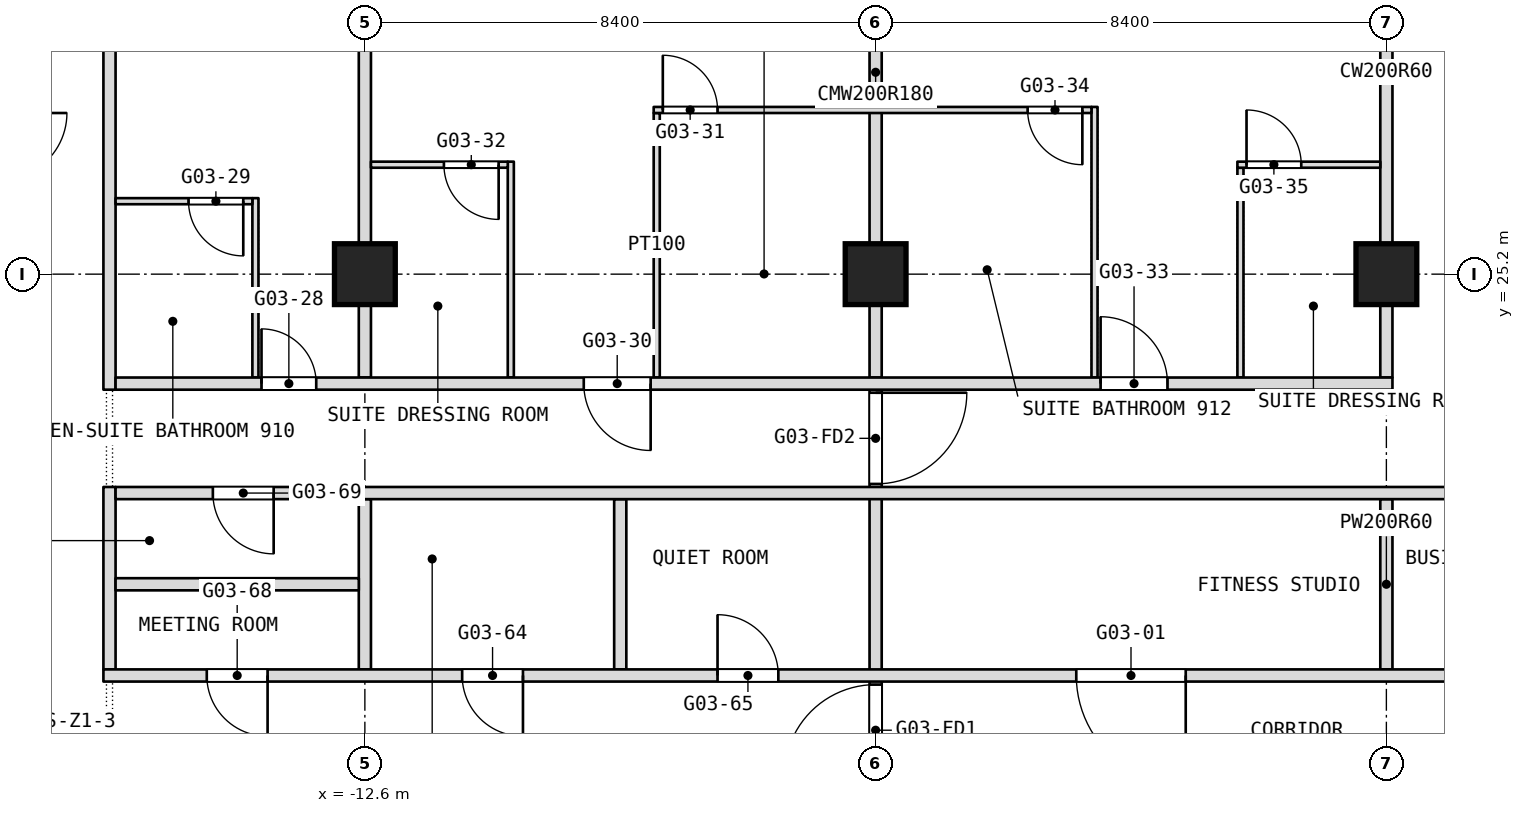
"""IFC4 building model, lengths in metres.
Left out: names, types, materials, properties, quantities, classifications, styles, units other than length and angle.
Written with IfcOpenShell. Run it as: python <this file> out.ifc"""

import sys

from ifc_helpers import new_model, si_unit, direction, frame, frame_2d, origin, origin_2d, place, context, subcontext, project, spatial, rectangle, extrude, element, fill, save


model = new_model("IFC4")
c1 = context("Model", 3, precision=1e-05, world=origin(), true_north=direction((0.0, 1.0)))
c2 = subcontext(c1, "Body", "Model", "MODEL_VIEW")
j1 = project(units=[si_unit("LENGTHUNIT", "METRE"), si_unit("PLANEANGLEUNIT", "RADIAN")], contexts=[c1])
p1 = place(None, origin())
s1 = spatial("IfcSite", under=j1, at=p1, CompositionType="ELEMENT")
p2 = place(p1, origin())
s2 = spatial("IfcBuilding", under=s1, at=p2, CompositionType="ELEMENT")
p3 = place(p2, frame((0.0, 0.0, 47.3)))
s3 = spatial("IfcBuildingStorey", under=s2, at=p3, CompositionType="ELEMENT", Elevation=47.3)
for number, where, z_axis, x_axis in (
    (1, (-12.6, 25.2, 0.0), (0.0, 0.0, 1.0), (1.0, 0.0, 0.0)),
    (2, (-4.2, 25.2, 0.0), (0.0, 0.0, 1.0), (1.0, 0.0, 0.0)),
    (3, (4.2, 25.2, 0.0), (0.0, 0.0, 1.0), (1.0, 0.0, 0.0)),
):
    element("IfcColumn", number, at=place(p3, frame(where, z_axis=z_axis, x_axis=x_axis)), inside=s3, PredefinedType="COLUMN", context=c2, shape_type="SweptSolid", body=[
        extrude(rectangle(XDim=1.0, YDim=1.0, at=origin_2d()), origin(), (0.0, 0.0, 1.0), 3.6),
    ])
p4 = place(p3, frame((4.2, 18.7, 0.0), z_axis=(0.0, 0.0, 1.0), x_axis=(0.0, 1.0, 0.0)))
e4 = element("IfcWall", 4, at=p4, inside=s3, PredefinedType="PARTITIONING", context=c2, shape_type="SweptSolid", body=[
    extrude(rectangle(XDim=2.8, YDim=0.2, at=frame_2d((1.4, 0.0))), origin(), (0.0, 0.0, 1.0), 3.34),
])
p5 = place(p3, frame((4.2, 23.5, 0.0), z_axis=(0.0, 0.0, 1.0), x_axis=(0.0, 1.0, 0.0)))
e5 = element("IfcWall", 5, at=p5, inside=s3, PredefinedType="PARTITIONING", context=c2, shape_type="SweptSolid", body=[
    extrude(rectangle(XDim=10.04, YDim=0.2, at=frame_2d((5.02, 0.0))), origin(), (0.0, 0.0, 1.0), 3.34),
])
p6 = place(p3, frame((1.8, 23.5, 0.0), z_axis=(0.0, 0.0, 1.0), x_axis=(0.0, 1.0, 0.0)))
e6 = element("IfcWall", 6, at=p6, inside=s3, PredefinedType="PARTITIONING", context=c2, shape_type="SweptSolid", body=[
    extrude(rectangle(XDim=3.45, YDim=0.1, at=frame_2d((1.725, 0.0))), origin(), (0.0, 0.0, 1.0), 3.34),
])
p7 = place(p3, frame((-0.6, 23.5, 0.0), z_axis=(0.0, 0.0, 1.0), x_axis=(0.0, 1.0, 0.0)))
e7 = element("IfcWall", 7, at=p7, inside=s3, PredefinedType="PARTITIONING", context=c2, shape_type="SweptSolid", body=[
    extrude(rectangle(XDim=4.45, YDim=0.1, at=frame_2d((2.225, 0.0))), origin(), (0.0, 0.0, 1.0), 3.34),
])
p8 = place(p3, frame((-4.2, 16.8, 0.0), z_axis=(0.0, 0.0, 1.0), x_axis=(0.0, 1.0, 0.0)))
e8 = element("IfcWall", 8, at=p8, inside=s3, PredefinedType="PARTITIONING", context=c2, shape_type="SweptSolid", body=[
    extrude(rectangle(XDim=6.7, YDim=0.2, at=frame_2d((3.35, 0.0))), origin(), (0.0, 0.0, 1.0), 3.34),
])
p9 = place(p8, frame((0.15, 0.0, 0.0)))
e9 = element("IfcOpeningElement", 9, at=p9, cuts=e8, PredefinedType="OPENING", context=c2, shape_type="SweptSolid", body=[
    extrude(rectangle(XDim=1.5, YDim=2.1, at=frame_2d((0.75, 1.05))), frame((0.0, 0.1, 0.0), z_axis=(0.0, -1.0, 0.0), x_axis=(1.0, 0.0, 0.0)), (0.0, 0.0, 1.0), 0.2),
])
p10 = place(p8, frame((4.95, 0.0, 0.0)))
e10 = element("IfcOpeningElement", 10, at=p10, cuts=e8, PredefinedType="OPENING", context=c2, shape_type="SweptSolid", body=[
    extrude(rectangle(XDim=1.5, YDim=2.1, at=frame_2d((0.75, 1.05))), frame((0.0, 0.1, 0.0), z_axis=(0.0, -1.0, 0.0), x_axis=(1.0, 0.0, 0.0)), (0.0, 0.0, 1.0), 0.2),
])
p11 = place(p3, frame((-4.2, 23.5, 0.0), z_axis=(0.0, 0.0, 1.0), x_axis=(0.0, 1.0, 0.0)))
e11 = element("IfcWall", 11, at=p11, inside=s3, PredefinedType="PARTITIONING", context=c2, shape_type="SweptSolid", body=[
    extrude(rectangle(XDim=10.04, YDim=0.2, at=frame_2d((5.02, 0.0))), origin(), (0.0, 0.0, 1.0), 3.34),
])
p12 = place(p3, frame((-7.8, 23.5, 0.0), z_axis=(0.0, 0.0, 1.0), x_axis=(0.0, 1.0, 0.0)))
e12 = element("IfcWall", 12, at=p12, inside=s3, PredefinedType="PARTITIONING", context=c2, shape_type="SweptSolid", body=[
    extrude(rectangle(XDim=4.35, YDim=0.1, at=frame_2d((2.175, 0.0))), origin(), (0.0, 0.0, 1.0), 3.34),
])
p13 = place(p3, frame((-8.4, 18.7, 0.0), z_axis=(0.0, 0.0, 1.0), x_axis=(0.0, 1.0, 0.0)))
e13 = element("IfcWall", 13, at=p13, inside=s3, PredefinedType="PARTITIONING", context=c2, shape_type="SweptSolid", body=[
    extrude(rectangle(XDim=2.8, YDim=0.2, at=frame_2d((1.4, 0.0))), origin(), (0.0, 0.0, 1.0), 3.34),
])
p14 = place(p3, frame((-10.2, 23.5, 0.0), z_axis=(0.0, 0.0, 1.0), x_axis=(0.0, 1.0, 0.0)))
e14 = element("IfcWall", 14, at=p14, inside=s3, PredefinedType="PARTITIONING", context=c2, shape_type="SweptSolid", body=[
    extrude(rectangle(XDim=3.55, YDim=0.1, at=frame_2d((1.775, 0.0))), origin(), (0.0, 0.0, 1.0), 3.34),
])
p15 = place(p3, frame((-12.6, 18.7, 0.0), z_axis=(0.0, 0.0, 1.0), x_axis=(0.0, 1.0, 0.0)))
e15 = element("IfcWall", 15, at=p15, inside=s3, PredefinedType="PARTITIONING", context=c2, shape_type="SweptSolid", body=[
    extrude(rectangle(XDim=2.8, YDim=0.2, at=frame_2d((1.4, 0.0))), origin(), (0.0, 0.0, 1.0), 3.34),
])
p16 = place(p3, frame((-12.6, 23.5, 0.0), z_axis=(0.0, 0.0, 1.0), x_axis=(0.0, 1.0, 0.0)))
e16 = element("IfcWall", 16, at=p16, inside=s3, PredefinedType="PARTITIONING", context=c2, shape_type="SweptSolid", body=[
    extrude(rectangle(XDim=10.04, YDim=0.2, at=frame_2d((5.02, 0.0))), origin(), (0.0, 0.0, 1.0), 3.34),
])
p17 = place(p3, frame((-14.4, 23.5, 0.0), z_axis=(0.0, 0.0, 1.0), x_axis=(0.0, 1.0, 0.0)))
e17 = element("IfcWall", 17, at=p17, inside=s3, PredefinedType="PARTITIONING", context=c2, shape_type="SweptSolid", body=[
    extrude(rectangle(XDim=2.95, YDim=0.1, at=frame_2d((1.475, 0.0))), origin(), (0.0, 0.0, 1.0), 3.34),
])
p18 = place(p3, frame((-16.8, 18.7, 0.0), z_axis=(0.0, 0.0, 1.0), x_axis=(0.0, 1.0, 0.0)))
e18 = element("IfcWall", 18, at=p18, inside=s3, PredefinedType="PARTITIONING", context=c2, shape_type="SweptSolid", body=[
    extrude(rectangle(XDim=3.0, YDim=0.2, at=frame_2d((1.5, 0.0))), origin(), (0.0, 0.0, 1.0), 3.34),
])
p19 = place(p3, frame((-16.8, 23.3, 0.0), z_axis=(0.0, 0.0, 1.0), x_axis=(0.0, 1.0, 0.0)))
e19 = element("IfcWall", 19, at=p19, inside=s3, PredefinedType="PARTITIONING", context=c2, shape_type="SweptSolid", body=[
    extrude(rectangle(XDim=10.24, YDim=0.2, at=frame_2d((5.12, 0.0))), origin(), (0.0, 0.0, 1.0), 3.34),
])
p20 = place(p3, frame((-16.9, 18.6, 0.0), z_axis=(0.0, 0.0, 1.0), x_axis=(1.0, 0.0, 0.0)))
e20 = element("IfcWall", 20, at=p20, inside=s3, PredefinedType="PARTITIONING", context=c2, shape_type="SweptSolid", body=[
    extrude(rectangle(XDim=25.1, YDim=0.2, at=frame_2d((12.55, 0.0))), origin(), (0.0, 0.0, 1.0), 3.34),
])
p21 = place(p20, frame((16.0, 0.0, 0.0)))
e21 = element("IfcOpeningElement", 21, at=p21, cuts=e20, PredefinedType="OPENING", context=c2, shape_type="SweptSolid", body=[
    extrude(rectangle(XDim=1.8, YDim=2.1, at=frame_2d((0.9, 1.05))), frame((0.0, 0.1, 0.0), z_axis=(0.0, -1.0, 0.0), x_axis=(1.0, 0.0, 0.0)), (0.0, 0.0, 1.0), 0.2),
])
p22 = place(p20, frame((22.55, 0.0, 0.0)))
e22 = element("IfcOpeningElement", 22, at=p22, cuts=e20, PredefinedType="OPENING", context=c2, shape_type="SweptSolid", body=[
    extrude(rectangle(XDim=1.0, YDim=2.1, at=frame_2d((0.5, 1.05))), frame((0.0, 0.1, 0.0), z_axis=(0.0, -1.0, 0.0), x_axis=(1.0, 0.0, 0.0)), (0.0, 0.0, 1.0), 0.2),
])
p23 = place(p20, frame((5.9, 0.0, 0.0)))
e23 = element("IfcOpeningElement", 23, at=p23, cuts=e20, PredefinedType="OPENING", context=c2, shape_type="SweptSolid", body=[
    extrude(rectangle(XDim=1.0, YDim=2.1, at=frame_2d((0.5, 1.05))), frame((0.0, 0.1, 0.0), z_axis=(0.0, -1.0, 0.0), x_axis=(1.0, 0.0, 0.0)), (0.0, 0.0, 1.0), 0.2),
])
p24 = place(p20, frame((10.1, 0.0, 0.0)))
e24 = element("IfcOpeningElement", 24, at=p24, cuts=e20, PredefinedType="OPENING", context=c2, shape_type="SweptSolid", body=[
    extrude(rectangle(XDim=1.0, YDim=2.1, at=frame_2d((0.5, 1.05))), frame((0.0, 0.1, 0.0), z_axis=(0.0, -1.0, 0.0), x_axis=(1.0, 0.0, 0.0)), (0.0, 0.0, 1.0), 0.2),
])
p25 = place(p20, frame((1.7, 0.0, 0.0)))
e25 = element("IfcOpeningElement", 25, at=p25, cuts=e20, PredefinedType="OPENING", context=c2, shape_type="SweptSolid", body=[
    extrude(rectangle(XDim=1.0, YDim=2.1, at=frame_2d((0.5, 1.05))), frame((0.0, 0.1, 0.0), z_axis=(0.0, -1.0, 0.0), x_axis=(1.0, 0.0, 0.0)), (0.0, 0.0, 1.0), 0.2),
])
p26 = place(p3, frame((-16.7, 20.1, 0.0), z_axis=(0.0, 0.0, 1.0), x_axis=(1.0, 0.0, 0.0)))
e26 = element("IfcWall", 26, at=p26, inside=s3, PredefinedType="PARTITIONING", context=c2, shape_type="SweptSolid", body=[
    extrude(rectangle(XDim=4.0, YDim=0.2, at=frame_2d((2.0, 0.0))), origin(), (0.0, 0.0, 1.0), 3.34),
])
p27 = place(p3, frame((-16.7, 21.6, 0.0), z_axis=(0.0, 0.0, 1.0), x_axis=(1.0, 0.0, 0.0)))
e27 = element("IfcWall", 27, at=p27, inside=s3, PredefinedType="PARTITIONING", context=c2, shape_type="SweptSolid", body=[
    extrude(rectangle(XDim=24.9, YDim=0.2, at=frame_2d((12.45, 0.0))), origin(), (0.0, 0.0, 1.0), 3.34),
])
p28 = place(p27, frame((1.6, 0.0, 0.0)))
e28 = element("IfcOpeningElement", 28, at=p28, cuts=e27, PredefinedType="OPENING", context=c2, shape_type="SweptSolid", body=[
    extrude(rectangle(XDim=1.0, YDim=2.1, at=frame_2d((0.5, 1.05))), frame((0.0, 0.1, 0.0), z_axis=(0.0, -1.0, 0.0), x_axis=(1.0, 0.0, 0.0)), (0.0, 0.0, 1.0), 0.2),
])
p29 = place(p3, frame((-16.7, 23.4, 0.0), z_axis=(0.0, 0.0, 1.0), x_axis=(1.0, 0.0, 0.0)))
e29 = element("IfcWall", 29, at=p29, inside=s3, PredefinedType="PARTITIONING", context=c2, shape_type="SweptSolid", body=[
    extrude(rectangle(XDim=21.0, YDim=0.2, at=frame_2d((10.5, 0.0))), origin(), (0.0, 0.0, 1.0), 3.34),
])
p30 = place(p29, frame((2.4, 0.0, 0.0)))
e30 = element("IfcOpeningElement", 30, at=p30, cuts=e29, PredefinedType="OPENING", context=c2, shape_type="SweptSolid", body=[
    extrude(rectangle(XDim=0.9, YDim=2.1, at=frame_2d((0.45, 1.05))), frame((0.0, 0.1, 0.0), z_axis=(0.0, -1.0, 0.0), x_axis=(1.0, 0.0, 0.0)), (0.0, 0.0, 1.0), 0.2),
])
p31 = place(p29, frame((7.7, 0.0, 0.0)))
e31 = element("IfcOpeningElement", 31, at=p31, cuts=e29, PredefinedType="OPENING", context=c2, shape_type="SweptSolid", body=[
    extrude(rectangle(XDim=1.1, YDim=2.1, at=frame_2d((0.55, 1.05))), frame((0.0, 0.1, 0.0), z_axis=(0.0, -1.0, 0.0), x_axis=(1.0, 0.0, 0.0)), (0.0, 0.0, 1.0), 0.2),
])
p32 = place(p29, frame((16.2, 0.0, 0.0)))
e32 = element("IfcOpeningElement", 32, at=p32, cuts=e29, PredefinedType="OPENING", context=c2, shape_type="SweptSolid", body=[
    extrude(rectangle(XDim=1.1, YDim=2.1, at=frame_2d((0.55, 1.05))), frame((0.0, 0.1, 0.0), z_axis=(0.0, -1.0, 0.0), x_axis=(1.0, 0.0, 0.0)), (0.0, 0.0, 1.0), 0.2),
])
p33 = place(p3, frame((-16.7, 26.4, 0.0), z_axis=(0.0, 0.0, 1.0), x_axis=(1.0, 0.0, 0.0)))
e33 = element("IfcWall", 33, at=p33, inside=s3, PredefinedType="PARTITIONING", context=c2, shape_type="SweptSolid", body=[
    extrude(rectangle(XDim=2.25, YDim=0.1, at=frame_2d((1.125, 0.0))), origin(), (0.0, 0.0, 1.0), 3.34),
])
p34 = place(p33, frame((1.2, 0.0, 0.0)))
e34 = element("IfcOpeningElement", 34, at=p34, cuts=e33, PredefinedType="OPENING", context=c2, shape_type="SweptSolid", body=[
    extrude(rectangle(XDim=0.9, YDim=2.1, at=frame_2d((0.45, 1.05))), frame((0.0, 0.05, 0.0), z_axis=(0.0, -1.0, 0.0), x_axis=(1.0, 0.0, 0.0)), (0.0, 0.0, 1.0), 0.1),
])
p35 = place(p3, frame((-12.5, 27.0, 0.0), z_axis=(0.0, 0.0, 1.0), x_axis=(1.0, 0.0, 0.0)))
e35 = element("IfcWall", 35, at=p35, inside=s3, PredefinedType="PARTITIONING", context=c2, shape_type="SweptSolid", body=[
    extrude(rectangle(XDim=2.25, YDim=0.1, at=frame_2d((1.125, 0.0))), origin(), (0.0, 0.0, 1.0), 3.34),
])
p36 = place(p35, frame((1.2, 0.0, 0.0)))
e36 = element("IfcOpeningElement", 36, at=p36, cuts=e35, PredefinedType="OPENING", context=c2, shape_type="SweptSolid", body=[
    extrude(rectangle(XDim=0.9, YDim=2.1, at=frame_2d((0.45, 1.05))), frame((0.0, 0.05, 0.0), z_axis=(0.0, -1.0, 0.0), x_axis=(1.0, 0.0, 0.0)), (0.0, 0.0, 1.0), 0.1),
])
p37 = place(p3, frame((1.75, 27.0, 0.0), z_axis=(0.0, 0.0, 1.0), x_axis=(1.0, 0.0, 0.0)))
e37 = element("IfcWall", 37, at=p37, inside=s3, PredefinedType="PARTITIONING", context=c2, shape_type="SweptSolid", body=[
    extrude(rectangle(XDim=2.35, YDim=0.1, at=frame_2d((1.175, 0.0))), origin(), (0.0, 0.0, 1.0), 3.34),
])
p38 = place(p37, frame((0.15, 0.0, 0.0)))
e38 = element("IfcOpeningElement", 38, at=p38, cuts=e37, PredefinedType="OPENING", context=c2, shape_type="SweptSolid", body=[
    extrude(rectangle(XDim=0.9, YDim=2.1, at=frame_2d((0.45, 1.05))), frame((0.0, 0.05, 0.0), z_axis=(0.0, -1.0, 0.0), x_axis=(1.0, 0.0, 0.0)), (0.0, 0.0, 1.0), 0.1),
])
p39 = place(p3, frame((-7.85, 27.9, 0.0), z_axis=(0.0, 0.0, 1.0), x_axis=(1.0, 0.0, 0.0)))
e39 = element("IfcWall", 39, at=p39, inside=s3, PredefinedType="PARTITIONING", context=c2, shape_type="SweptSolid", body=[
    extrude(rectangle(XDim=7.2, YDim=0.1, at=frame_2d((3.6, 0.0))), origin(), (0.0, 0.0, 1.0), 3.34),
])
p40 = place(p39, frame((0.15, 0.0, 0.0)))
e40 = element("IfcOpeningElement", 40, at=p40, cuts=e39, PredefinedType="OPENING", context=c2, shape_type="SweptSolid", body=[
    extrude(rectangle(XDim=0.9, YDim=2.1, at=frame_2d((0.45, 1.05))), frame((0.0, 0.05, 0.0), z_axis=(0.0, -1.0, 0.0), x_axis=(1.0, 0.0, 0.0)), (0.0, 0.0, 1.0), 0.1),
])
p41 = place(p39, frame((6.15, 0.0, 0.0)))
e41 = element("IfcOpeningElement", 41, at=p41, cuts=e39, PredefinedType="OPENING", context=c2, shape_type="SweptSolid", body=[
    extrude(rectangle(XDim=0.9, YDim=2.1, at=frame_2d((0.45, 1.05))), frame((0.0, 0.05, 0.0), z_axis=(0.0, -1.0, 0.0), x_axis=(1.0, 0.0, 0.0)), (0.0, 0.0, 1.0), 0.1),
])
p42 = place(p21, origin())
e42 = element("IfcDoor", 42, at=p42, inside=s3, OperationType="DOUBLE_DOOR_SINGLE_SWING", PredefinedType="DOOR", context=c2, shape_type="SweptSolid", body=[
    extrude(rectangle(XDim=1.8, YDim=2.1, at=frame_2d((0.9, 1.05))), frame((0.0, 0.025, 0.0), z_axis=(0.0, -1.0, 0.0), x_axis=(1.0, 0.0, 0.0)), (0.0, 0.0, 1.0), 0.05),
])
fill(e21, e42)
p43 = place(p23, origin())
e43 = element("IfcDoor", 43, at=p43, inside=s3, OperationType="SINGLE_SWING_RIGHT", PredefinedType="DOOR", context=c2, shape_type="SweptSolid", body=[
    extrude(rectangle(XDim=1.0, YDim=2.1, at=frame_2d((0.5, 1.05))), frame((0.0, 0.025, 0.0), z_axis=(0.0, -1.0, 0.0), x_axis=(1.0, 0.0, 0.0)), (0.0, 0.0, 1.0), 0.05),
])
fill(e23, e43)
p44 = place(p24, origin())
e44 = element("IfcDoor", 44, at=p44, inside=s3, OperationType="SINGLE_SWING_LEFT", PredefinedType="DOOR", context=c2, shape_type="SweptSolid", body=[
    extrude(rectangle(XDim=1.0, YDim=2.1, at=frame_2d((0.5, 1.05))), frame((0.0, 0.025, 0.0), z_axis=(0.0, -1.0, 0.0), x_axis=(1.0, 0.0, 0.0)), (0.0, 0.0, 1.0), 0.05),
])
fill(e24, e44)
p45 = place(p25, origin())
e45 = element("IfcDoor", 45, at=p45, inside=s3, OperationType="SINGLE_SWING_RIGHT", PredefinedType="DOOR", context=c2, shape_type="SweptSolid", body=[
    extrude(rectangle(XDim=1.0, YDim=2.1, at=frame_2d((0.5, 1.05))), frame((0.0, 0.025, 0.0), z_axis=(0.0, -1.0, 0.0), x_axis=(1.0, 0.0, 0.0)), (0.0, 0.0, 1.0), 0.05),
])
fill(e25, e45)
p46 = place(p28, origin())
e46 = element("IfcDoor", 46, at=p46, inside=s3, OperationType="SINGLE_SWING_RIGHT", PredefinedType="DOOR", context=c2, shape_type="SweptSolid", body=[
    extrude(rectangle(XDim=1.0, YDim=2.1, at=frame_2d((0.5, 1.05))), frame((0.0, 0.025, 0.0), z_axis=(0.0, -1.0, 0.0), x_axis=(1.0, 0.0, 0.0)), (0.0, 0.0, 1.0), 0.05),
])
fill(e28, e46)
p47 = place(p30, origin())
e47 = element("IfcDoor", 47, at=p47, inside=s3, OperationType="SINGLE_SWING_LEFT", PredefinedType="DOOR", context=c2, shape_type="SweptSolid", body=[
    extrude(rectangle(XDim=0.9, YDim=2.1, at=frame_2d((0.45, 1.05))), frame((0.0, 0.025, 0.0), z_axis=(0.0, -1.0, 0.0), x_axis=(1.0, 0.0, 0.0)), (0.0, 0.0, 1.0), 0.05),
])
fill(e30, e47)
p48 = place(p31, origin())
e48 = element("IfcDoor", 48, at=p48, inside=s3, OperationType="SINGLE_SWING_RIGHT", PredefinedType="DOOR", context=c2, shape_type="SweptSolid", body=[
    extrude(rectangle(XDim=1.1, YDim=2.1, at=frame_2d((0.55, 1.05))), frame((0.0, 0.025, 0.0), z_axis=(0.0, -1.0, 0.0), x_axis=(1.0, 0.0, 0.0)), (0.0, 0.0, 1.0), 0.05),
])
fill(e31, e48)
p49 = place(p32, origin())
e49 = element("IfcDoor", 49, at=p49, inside=s3, OperationType="SINGLE_SWING_LEFT", PredefinedType="DOOR", context=c2, shape_type="SweptSolid", body=[
    extrude(rectangle(XDim=1.1, YDim=2.1, at=frame_2d((0.55, 1.05))), frame((0.0, 0.025, 0.0), z_axis=(0.0, -1.0, 0.0), x_axis=(1.0, 0.0, 0.0)), (0.0, 0.0, 1.0), 0.05),
])
fill(e32, e49)
p50 = place(p34, origin())
e50 = element("IfcDoor", 50, at=p50, inside=s3, OperationType="SINGLE_SWING_LEFT", PredefinedType="DOOR", context=c2, shape_type="SweptSolid", body=[
    extrude(rectangle(XDim=0.9, YDim=2.1, at=frame_2d((0.45, 1.05))), frame((0.0, 0.025, 0.0), z_axis=(0.0, -1.0, 0.0), x_axis=(1.0, 0.0, 0.0)), (0.0, 0.0, 1.0), 0.05),
])
fill(e34, e50)
p51 = place(p36, origin())
e51 = element("IfcDoor", 51, at=p51, inside=s3, OperationType="SINGLE_SWING_LEFT", PredefinedType="DOOR", context=c2, shape_type="SweptSolid", body=[
    extrude(rectangle(XDim=0.9, YDim=2.1, at=frame_2d((0.45, 1.05))), frame((0.0, 0.025, 0.0), z_axis=(0.0, -1.0, 0.0), x_axis=(1.0, 0.0, 0.0)), (0.0, 0.0, 1.0), 0.05),
])
fill(e36, e51)
p52 = place(p38, origin())
e52 = element("IfcDoor", 52, at=p52, inside=s3, OperationType="SINGLE_SWING_RIGHT", PredefinedType="DOOR", context=c2, shape_type="SweptSolid", body=[
    extrude(rectangle(XDim=0.9, YDim=2.1, at=frame_2d((0.45, 1.05))), frame((0.0, 0.025, 0.0), z_axis=(0.0, -1.0, 0.0), x_axis=(1.0, 0.0, 0.0)), (0.0, 0.0, 1.0), 0.05),
])
fill(e38, e52)
p53 = place(p40, origin())
e53 = element("IfcDoor", 53, at=p53, inside=s3, OperationType="SINGLE_SWING_RIGHT", PredefinedType="DOOR", context=c2, shape_type="SweptSolid", body=[
    extrude(rectangle(XDim=0.9, YDim=2.1, at=frame_2d((0.45, 1.05))), frame((0.0, 0.025, 0.0), z_axis=(0.0, -1.0, 0.0), x_axis=(1.0, 0.0, 0.0)), (0.0, 0.0, 1.0), 0.05),
])
fill(e40, e53)
p54 = place(p41, origin())
e54 = element("IfcDoor", 54, at=p54, inside=s3, OperationType="SINGLE_SWING_LEFT", PredefinedType="DOOR", context=c2, shape_type="SweptSolid", body=[
    extrude(rectangle(XDim=0.9, YDim=2.1, at=frame_2d((0.45, 1.05))), frame((0.0, 0.025, 0.0), z_axis=(0.0, -1.0, 0.0), x_axis=(1.0, 0.0, 0.0)), (0.0, 0.0, 1.0), 0.05),
])
fill(e41, e54)
p55 = place(p9, origin())
e55 = element("IfcDoor", 55, at=p55, inside=s3, OperationType="DOUBLE_DOOR_DOUBLE_SWING", PredefinedType="DOOR", context=c2, shape_type="SweptSolid", body=[
    extrude(rectangle(XDim=1.5, YDim=2.1, at=frame_2d((0.75, 1.05))), frame((0.0, 0.025, 0.0), z_axis=(0.0, -1.0, 0.0), x_axis=(1.0, 0.0, 0.0)), (0.0, 0.0, 1.0), 0.05),
])
fill(e9, e55)
p56 = place(p10, origin())
e56 = element("IfcDoor", 56, at=p56, inside=s3, OperationType="DOUBLE_DOOR_DOUBLE_SWING", PredefinedType="DOOR", context=c2, shape_type="SweptSolid", body=[
    extrude(rectangle(XDim=1.5, YDim=2.1, at=frame_2d((0.75, 1.05))), frame((0.0, 0.025, 0.0), z_axis=(0.0, -1.0, 0.0), x_axis=(1.0, 0.0, 0.0)), (0.0, 0.0, 1.0), 0.05),
])
fill(e10, e56)
save(model, sys.argv[1])
